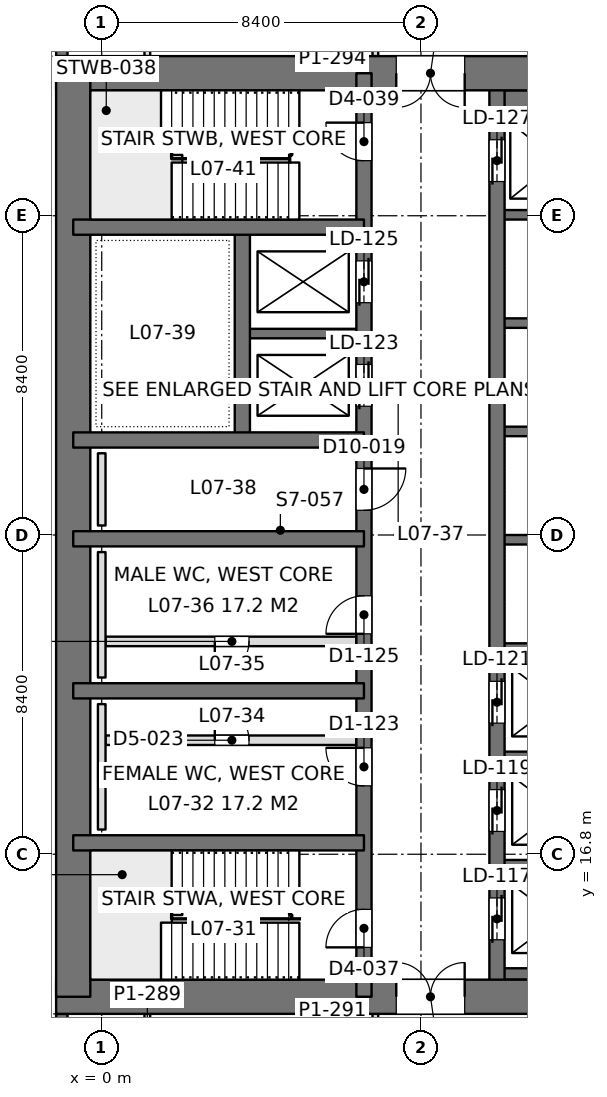
"""IFC4 building model, lengths in metres.
Left out: names, types, materials, properties, quantities, classifications, styles, units other than length and angle.
Written with IfcOpenShell. Run it as: python <this file> out.ifc"""

import sys

from ifc_helpers import new_model, si_unit, direction, frame, frame_2d, origin, place, context, subcontext, project, spatial, rectangle, extrude, element, fill, save


model = new_model("IFC4")
c1 = context("Model", 3, precision=1e-05, world=origin(), true_north=direction((0.0, 1.0)))
c2 = subcontext(c1, "Body", "Model", "MODEL_VIEW")
j1 = project(units=[si_unit("LENGTHUNIT", "METRE"), si_unit("PLANEANGLEUNIT", "RADIAN")], contexts=[c1])
p1 = place(None, origin())
s1 = spatial("IfcSite", under=j1, at=p1, CompositionType="ELEMENT")
p2 = place(p1, origin())
s2 = spatial("IfcBuilding", under=s1, at=p2, CompositionType="ELEMENT")
p3 = place(p2, frame((0.0, 0.0, 32.4)))
s3 = spatial("IfcBuildingStorey", under=s2, at=p3, CompositionType="ELEMENT", Elevation=32.4)
p4 = place(p3, frame((-1.2, 13.05, 0.0), z_axis=(0.0, 0.0, 1.0), x_axis=(1.0, 0.0, 0.0)))
e1 = element("IfcWall", 1, at=p4, inside=s3, PredefinedType="SHEAR", context=c2, shape_type="SweptSolid", body=[
    extrude(rectangle(XDim=18.0, YDim=0.9, at=frame_2d((9.0, 0.0))), origin(), (0.0, 0.0, 1.0), 4.5),
])
p5 = place(p4, frame((8.95, 0.0, 0.0)))
e2 = element("IfcOpeningElement", 2, at=p5, cuts=e1, PredefinedType="OPENING", context=c2, shape_type="SweptSolid", body=[
    extrude(rectangle(XDim=1.8, YDim=2.4, at=frame_2d((0.9, 1.2))), frame((0.0, 0.46, 0.0), z_axis=(0.0, -1.0, 0.0), x_axis=(1.0, 0.0, 0.0)), (0.0, 0.0, 1.0), 0.92),
])
p6 = place(p3, frame((-1.2, 37.35, 0.0), z_axis=(0.0, 0.0, 1.0), x_axis=(1.0, 0.0, 0.0)))
e3 = element("IfcWall", 3, at=p6, inside=s3, PredefinedType="SHEAR", context=c2, shape_type="SweptSolid", body=[
    extrude(rectangle(XDim=18.0, YDim=0.9, at=frame_2d((9.0, 0.0))), origin(), (0.0, 0.0, 1.0), 4.5),
])
p7 = place(p6, frame((8.95, 0.0, 0.0)))
e4 = element("IfcOpeningElement", 4, at=p7, cuts=e3, PredefinedType="OPENING", context=c2, shape_type="SweptSolid", body=[
    extrude(rectangle(XDim=1.8, YDim=2.4, at=frame_2d((0.9, 1.2))), frame((0.0, 0.46, 0.0), z_axis=(0.0, -1.0, 0.0), x_axis=(1.0, 0.0, 0.0)), (0.0, 0.0, 1.0), 0.92),
])
p8 = place(p3, frame((-0.75, 13.05, 0.0), z_axis=(0.0, 0.0, 1.0), x_axis=(0.0, 1.0, 0.0)))
e5 = element("IfcWall", 5, at=p8, inside=s3, PredefinedType="SHEAR", context=c2, shape_type="SweptSolid", body=[
    extrude(rectangle(XDim=24.3, YDim=0.9, at=frame_2d((12.15, 0.0))), origin(), (0.0, 0.0, 1.0), 4.5),
])
p9 = place(p3, frame((6.9, 13.05, 0.0), z_axis=(0.0, 0.0, 1.0), x_axis=(0.0, 1.0, 0.0)))
e6 = element("IfcWall", 6, at=p9, inside=s3, PredefinedType="SHEAR", context=c2, shape_type="SweptSolid", body=[
    extrude(rectangle(XDim=24.3, YDim=0.4, at=frame_2d((12.15, 0.0))), origin(), (0.0, 0.0, 1.0), 4.5),
])
p10 = place(p9, frame((1.3, 0.0, 0.0)))
e7 = element("IfcOpeningElement", 7, at=p10, cuts=e6, PredefinedType="OPENING", context=c2, shape_type="SweptSolid", body=[
    extrude(rectangle(XDim=1.0, YDim=2.2, at=frame_2d((0.5, 1.1))), frame((0.0, 0.21, 0.0), z_axis=(0.0, -1.0, 0.0), x_axis=(1.0, 0.0, 0.0)), (0.0, 0.0, 1.0), 0.42),
])
p11 = place(p9, frame((22.0, 0.0, 0.0)))
e8 = element("IfcOpeningElement", 8, at=p11, cuts=e6, PredefinedType="OPENING", context=c2, shape_type="SweptSolid", body=[
    extrude(rectangle(XDim=1.0, YDim=2.2, at=frame_2d((0.5, 1.1))), frame((0.0, 0.21, 0.0), z_axis=(0.0, -1.0, 0.0), x_axis=(1.0, 0.0, 0.0)), (0.0, 0.0, 1.0), 0.42),
])
p12 = place(p9, frame((5.55, 0.0, 0.0)))
e9 = element("IfcOpeningElement", 9, at=p12, cuts=e6, PredefinedType="OPENING", context=c2, shape_type="SweptSolid", body=[
    extrude(rectangle(XDim=1.0, YDim=2.2, at=frame_2d((0.5, 1.1))), frame((0.0, 0.21, 0.0), z_axis=(0.0, -1.0, 0.0), x_axis=(1.0, 0.0, 0.0)), (0.0, 0.0, 1.0), 0.42),
])
p13 = place(p9, frame((9.55, 0.0, 0.0)))
e10 = element("IfcOpeningElement", 10, at=p13, cuts=e6, PredefinedType="OPENING", context=c2, shape_type="SweptSolid", body=[
    extrude(rectangle(XDim=1.0, YDim=2.2, at=frame_2d((0.5, 1.1))), frame((0.0, 0.21, 0.0), z_axis=(0.0, -1.0, 0.0), x_axis=(1.0, 0.0, 0.0)), (0.0, 0.0, 1.0), 0.42),
])
p14 = place(p9, frame((12.8, 0.0, 0.0)))
e11 = element("IfcOpeningElement", 11, at=p14, cuts=e6, PredefinedType="OPENING", context=c2, shape_type="SweptSolid", body=[
    extrude(rectangle(XDim=1.1, YDim=2.2, at=frame_2d((0.55, 1.1))), frame((0.0, 0.21, 0.0), z_axis=(0.0, -1.0, 0.0), x_axis=(1.0, 0.0, 0.0)), (0.0, 0.0, 1.0), 0.42),
])
p15 = place(p9, frame((15.538, 0.0, 0.0)))
e12 = element("IfcOpeningElement", 12, at=p15, cuts=e6, PredefinedType="OPENING", context=c2, shape_type="SweptSolid", body=[
    extrude(rectangle(XDim=1.1, YDim=2.2, at=frame_2d((0.55, 1.1))), frame((0.0, 0.21, 0.0), z_axis=(0.0, -1.0, 0.0), x_axis=(1.0, 0.0, 0.0)), (0.0, 0.0, 1.0), 0.42),
])
p16 = place(p9, frame((18.262, 0.0, 0.0)))
e13 = element("IfcOpeningElement", 13, at=p16, cuts=e6, PredefinedType="OPENING", context=c2, shape_type="SweptSolid", body=[
    extrude(rectangle(XDim=1.1, YDim=2.2, at=frame_2d((0.55, 1.1))), frame((0.0, 0.21, 0.0), z_axis=(0.0, -1.0, 0.0), x_axis=(1.0, 0.0, 0.0)), (0.0, 0.0, 1.0), 0.42),
])
p17 = place(p3, frame((10.4, 13.05, 0.0), z_axis=(0.0, 0.0, 1.0), x_axis=(0.0, 1.0, 0.0)))
e14 = element("IfcWall", 14, at=p17, inside=s3, PredefinedType="SHEAR", context=c2, shape_type="SweptSolid", body=[
    extrude(rectangle(XDim=24.3, YDim=0.4, at=frame_2d((12.15, 0.0))), origin(), (0.0, 0.0, 1.0), 4.5),
])
p18 = place(p17, frame((1.5, 0.0, 0.0)))
e15 = element("IfcOpeningElement", 15, at=p18, cuts=e14, PredefinedType="OPENING", context=c2, shape_type="SweptSolid", body=[
    extrude(rectangle(XDim=1.1, YDim=2.2, at=frame_2d((0.55, 1.1))), frame((0.0, 0.21, 0.0), z_axis=(0.0, -1.0, 0.0), x_axis=(1.0, 0.0, 0.0)), (0.0, 0.0, 1.0), 0.42),
])
p19 = place(p17, frame((4.35, 0.0, 0.0)))
e16 = element("IfcOpeningElement", 16, at=p19, cuts=e14, PredefinedType="OPENING", context=c2, shape_type="SweptSolid", body=[
    extrude(rectangle(XDim=1.1, YDim=2.2, at=frame_2d((0.55, 1.1))), frame((0.0, 0.21, 0.0), z_axis=(0.0, -1.0, 0.0), x_axis=(1.0, 0.0, 0.0)), (0.0, 0.0, 1.0), 0.42),
])
p20 = place(p17, frame((7.2, 0.0, 0.0)))
e17 = element("IfcOpeningElement", 17, at=p20, cuts=e14, PredefinedType="OPENING", context=c2, shape_type="SweptSolid", body=[
    extrude(rectangle(XDim=1.1, YDim=2.2, at=frame_2d((0.55, 1.1))), frame((0.0, 0.21, 0.0), z_axis=(0.0, -1.0, 0.0), x_axis=(1.0, 0.0, 0.0)), (0.0, 0.0, 1.0), 0.42),
])
p21 = place(p17, frame((21.45, 0.0, 0.0)))
e18 = element("IfcOpeningElement", 18, at=p21, cuts=e14, PredefinedType="OPENING", context=c2, shape_type="SweptSolid", body=[
    extrude(rectangle(XDim=1.1, YDim=2.2, at=frame_2d((0.55, 1.1))), frame((0.0, 0.21, 0.0), z_axis=(0.0, -1.0, 0.0), x_axis=(1.0, 0.0, 0.0)), (0.0, 0.0, 1.0), 0.42),
])
for number, where, z_axis, x_axis in (
    (19, (-0.75, 17.1, 0.0), (0.0, 0.0, 1.0), (1.0, 0.0, 0.0)),
    (20, (-0.75, 21.1, 0.0), (0.0, 0.0, 1.0), (1.0, 0.0, 0.0)),
    (21, (-0.75, 25.1, 0.0), (0.0, 0.0, 1.0), (1.0, 0.0, 0.0)),
    (22, (-0.75, 27.7, 0.0), (0.0, 0.0, 1.0), (1.0, 0.0, 0.0)),
    (23, (-0.75, 33.3, 0.0), (0.0, 0.0, 1.0), (1.0, 0.0, 0.0)),
):
    element("IfcWall", number, at=place(p3, frame(where, z_axis=z_axis, x_axis=x_axis)), inside=s3, PredefinedType="SHEAR", context=c2, shape_type="SweptSolid", body=[
        extrude(rectangle(XDim=7.65, YDim=0.4, at=frame_2d((3.825, 0.0))), origin(), (0.0, 0.0, 1.0), 4.5),
    ])
p22 = place(p3, frame((3.7, 27.7, 0.0), z_axis=(0.0, 0.0, 1.0), x_axis=(0.0, 1.0, 0.0)))
e24 = element("IfcWall", 24, at=p22, inside=s3, PredefinedType="SHEAR", context=c2, shape_type="SweptSolid", body=[
    extrude(rectangle(XDim=5.6, YDim=0.4, at=frame_2d((2.8, 0.0))), origin(), (0.0, 0.0, 1.0), 4.5),
])
p23 = place(p3, frame((3.7, 30.5, 0.0), z_axis=(0.0, 0.0, 1.0), x_axis=(1.0, 0.0, 0.0)))
e25 = element("IfcWall", 25, at=p23, inside=s3, PredefinedType="SHEAR", context=c2, shape_type="SweptSolid", body=[
    extrude(rectangle(XDim=3.2, YDim=0.25, at=frame_2d((1.6, 0.0))), origin(), (0.0, 0.0, 1.0), 4.5),
])
p24 = place(p3, frame((10.4, 13.65, 0.0), z_axis=(0.0, 0.0, 1.0), x_axis=(1.0, 0.0, 0.0)))
e26 = element("IfcWall", 26, at=p24, inside=s3, PredefinedType="SHEAR", context=c2, shape_type="SweptSolid", body=[
    extrude(rectangle(XDim=3.2, YDim=0.3, at=frame_2d((1.6, 0.0))), origin(), (0.0, 0.0, 1.0), 4.5),
])
for number, where, z_axis, x_axis in (
    (27, (10.4, 16.525, 0.0), (0.0, 0.0, 1.0), (1.0, 0.0, 0.0)),
    (28, (10.4, 19.375, 0.0), (0.0, 0.0, 1.0), (1.0, 0.0, 0.0)),
    (29, (10.4, 22.225, 0.0), (0.0, 0.0, 1.0), (1.0, 0.0, 0.0)),
    (30, (10.4, 25.075, 0.0), (0.0, 0.0, 1.0), (1.0, 0.0, 0.0)),
    (31, (10.4, 27.925, 0.0), (0.0, 0.0, 1.0), (1.0, 0.0, 0.0)),
    (32, (10.4, 30.775, 0.0), (0.0, 0.0, 1.0), (1.0, 0.0, 0.0)),
    (33, (10.4, 33.625, 0.0), (0.0, 0.0, 1.0), (1.0, 0.0, 0.0)),
):
    element("IfcWall", number, at=place(p3, frame(where, z_axis=z_axis, x_axis=x_axis)), inside=s3, PredefinedType="SHEAR", context=c2, shape_type="SweptSolid", body=[
        extrude(rectangle(XDim=3.2, YDim=0.25, at=frame_2d((1.6, 0.0))), origin(), (0.0, 0.0, 1.0), 4.5),
    ])
p25 = place(p3, frame((10.4, 36.625, 0.0), z_axis=(0.0, 0.0, 1.0), x_axis=(1.0, 0.0, 0.0)))
e34 = element("IfcWall", 34, at=p25, inside=s3, PredefinedType="SHEAR", context=c2, shape_type="SweptSolid", body=[
    extrude(rectangle(XDim=3.2, YDim=0.55, at=frame_2d((1.6, 0.0))), origin(), (0.0, 0.0, 1.0), 4.5),
])
p26 = place(p3, frame((-1.05, 8.4, 0.0), z_axis=(0.0, 0.0, 1.0), x_axis=(0.0, 1.0, 0.0)))
e35 = element("IfcWall", 35, at=p26, inside=s3, PredefinedType="SOLIDWALL", context=c2, shape_type="SweptSolid", body=[
    extrude(rectangle(XDim=4.2, YDim=0.3, at=frame_2d((2.1, 0.0))), origin(), (0.0, 0.0, 1.0), 4.34),
])
p27 = place(p26, frame((0.9, 0.0, 0.9)))
e36 = element("IfcOpeningElement", 36, at=p27, cuts=e35, PredefinedType="OPENING", context=c2, shape_type="SweptSolid", body=[
    extrude(rectangle(XDim=2.4, YDim=1.9, at=frame_2d((1.2, 0.95))), frame((0.0, 0.16, 0.0), z_axis=(0.0, -1.0, 0.0), x_axis=(1.0, 0.0, 0.0)), (0.0, 0.0, 1.0), 0.32),
])
p28 = place(p3, frame((-1.05, 37.8, 0.0), z_axis=(0.0, 0.0, 1.0), x_axis=(0.0, 1.0, 0.0)))
e37 = element("IfcWall", 37, at=p28, inside=s3, PredefinedType="SOLIDWALL", context=c2, shape_type="SweptSolid", body=[
    extrude(rectangle(XDim=4.2, YDim=0.3, at=frame_2d((2.1, 0.0))), origin(), (0.0, 0.0, 1.0), 4.34),
])
p29 = place(p28, frame((0.9, 0.0, 0.9)))
e38 = element("IfcOpeningElement", 38, at=p29, cuts=e37, PredefinedType="OPENING", context=c2, shape_type="SweptSolid", body=[
    extrude(rectangle(XDim=2.4, YDim=1.9, at=frame_2d((1.2, 0.95))), frame((0.0, 0.16, 0.0), z_axis=(0.0, -1.0, 0.0), x_axis=(1.0, 0.0, 0.0)), (0.0, 0.0, 1.0), 0.32),
])
p30 = place(p3, frame((7.2, 10.474, 0.0), z_axis=(0.0, 0.0, 1.0), x_axis=(0.0, 1.0, 0.0)))
e39 = element("IfcWall", 39, at=p30, inside=s3, PredefinedType="PARTITIONING", context=c2, shape_type="SweptSolid", body=[
    extrude(rectangle(XDim=2.128, YDim=0.15, at=frame_2d((1.064, 0.0))), origin(), (0.0, 0.0, 1.0), 4.34),
])
p31 = place(p30, frame((0.526, 0.0, 0.0)))
e40 = element("IfcOpeningElement", 40, at=p31, cuts=e39, PredefinedType="OPENING", context=c2, shape_type="SweptSolid", body=[
    extrude(rectangle(XDim=1.0, YDim=2.2, at=frame_2d((0.5, 1.1))), frame((0.0, 0.085, 0.0), z_axis=(0.0, -1.0, 0.0), x_axis=(1.0, 0.0, 0.0)), (0.0, 0.0, 1.0), 0.17),
])
p32 = place(p3, frame((1.2, 10.4, 0.0), z_axis=(0.0, 0.0, 1.0), x_axis=(0.0, 1.0, 0.0)))
e41 = element("IfcWall", 41, at=p32, inside=s3, PredefinedType="PARTITIONING", context=c2, shape_type="SweptSolid", body=[
    extrude(rectangle(XDim=2.202, YDim=0.15, at=frame_2d((1.101, 0.0))), origin(), (0.0, 0.0, 1.0), 4.34),
])
p33 = place(p3, frame((7.2, 37.8, 0.0), z_axis=(0.0, 0.0, 1.0), x_axis=(0.0, 1.0, 0.0)))
e42 = element("IfcWall", 42, at=p33, inside=s3, PredefinedType="PARTITIONING", context=c2, shape_type="SweptSolid", body=[
    extrude(rectangle(XDim=2.126, YDim=0.15, at=frame_2d((1.063, 0.0))), origin(), (0.0, 0.0, 1.0), 4.34),
])
p34 = place(p33, frame((0.6, 0.0, 0.0)))
e43 = element("IfcOpeningElement", 43, at=p34, cuts=e42, PredefinedType="OPENING", context=c2, shape_type="SweptSolid", body=[
    extrude(rectangle(XDim=1.0, YDim=2.2, at=frame_2d((0.5, 1.1))), frame((0.0, 0.085, 0.0), z_axis=(0.0, -1.0, 0.0), x_axis=(1.0, 0.0, 0.0)), (0.0, 0.0, 1.0), 0.17),
])
p35 = place(p3, frame((1.2, 37.8, 0.0), z_axis=(0.0, 0.0, 1.0), x_axis=(0.0, 1.0, 0.0)))
e44 = element("IfcWall", 44, at=p35, inside=s3, PredefinedType="PARTITIONING", context=c2, shape_type="SweptSolid", body=[
    extrude(rectangle(XDim=2.2, YDim=0.15, at=frame_2d((1.1, 0.0))), origin(), (0.0, 0.0, 1.0), 4.34),
])
p36 = place(p3, frame((0.1, 22.4, 0.0), z_axis=(0.0, 0.0, 1.0), x_axis=(1.0, 0.0, 0.0)))
e45 = element("IfcWall", 45, at=p36, inside=s3, PredefinedType="PARTITIONING", context=c2, shape_type="SweptSolid", body=[
    extrude(rectangle(XDim=6.6, YDim=0.25, at=frame_2d((3.3, 0.0))), origin(), (0.0, 0.0, 1.0), 4.3),
])
p37 = place(p36, frame((2.875, 0.0, 0.0)))
e46 = element("IfcOpeningElement", 46, at=p37, cuts=e45, PredefinedType="OPENING", context=c2, shape_type="SweptSolid", body=[
    extrude(rectangle(XDim=0.9, YDim=2.2, at=frame_2d((0.45, 1.1))), frame((0.0, 0.135, 0.0), z_axis=(0.0, -1.0, 0.0), x_axis=(1.0, 0.0, 0.0)), (0.0, 0.0, 1.0), 0.27),
])
p38 = place(p3, frame((0.1, 19.8, 0.0), z_axis=(0.0, 0.0, 1.0), x_axis=(1.0, 0.0, 0.0)))
e47 = element("IfcWall", 47, at=p38, inside=s3, PredefinedType="PARTITIONING", context=c2, shape_type="SweptSolid", body=[
    extrude(rectangle(XDim=6.6, YDim=0.25, at=frame_2d((3.3, 0.0))), origin(), (0.0, 0.0, 1.0), 4.3),
])
p39 = place(p38, frame((2.875, 0.0, 0.0)))
e48 = element("IfcOpeningElement", 48, at=p39, cuts=e47, PredefinedType="OPENING", context=c2, shape_type="SweptSolid", body=[
    extrude(rectangle(XDim=0.9, YDim=2.2, at=frame_2d((0.45, 1.1))), frame((0.0, 0.135, 0.0), z_axis=(0.0, -1.0, 0.0), x_axis=(1.0, 0.0, 0.0)), (0.0, 0.0, 1.0), 0.27),
])
for number, where, z_axis, x_axis in (
    (49, (0.0, 17.45, 0.0), (0.0, 0.0, 1.0), (0.0, 1.0, 0.0)),
    (50, (0.0, 21.45, 0.0), (0.0, 0.0, 1.0), (0.0, 1.0, 0.0)),
):
    element("IfcWall", number, at=place(p3, frame(where, z_axis=z_axis, x_axis=x_axis)), inside=s3, PredefinedType="PLUMBINGWALL", context=c2, shape_type="SweptSolid", body=[
        extrude(rectangle(XDim=3.3, YDim=0.2, at=frame_2d((1.65, 0.0))), origin(), (0.0, 0.0, 1.0), 1.2),
    ])
p40 = place(p3, frame((0.0, 25.45, 0.0), z_axis=(0.0, 0.0, 1.0), x_axis=(0.0, 1.0, 0.0)))
e51 = element("IfcWall", 51, at=p40, inside=s3, PredefinedType="PLUMBINGWALL", context=c2, shape_type="SweptSolid", body=[
    extrude(rectangle(XDim=1.9, YDim=0.2, at=frame_2d((0.95, 0.0))), origin(), (0.0, 0.0, 1.0), 1.2),
])
p41 = place(p5, origin())
e52 = element("IfcDoor", 52, at=p41, inside=s3, OperationType="DOUBLE_DOOR_SINGLE_SWING", PredefinedType="DOOR", context=c2, shape_type="SweptSolid", body=[
    extrude(rectangle(XDim=1.8, YDim=2.4, at=frame_2d((0.9, 1.2))), frame((0.0, 0.025, 0.0), z_axis=(0.0, -1.0, 0.0), x_axis=(1.0, 0.0, 0.0)), (0.0, 0.0, 1.0), 0.05),
])
fill(e2, e52)
p42 = place(p7, frame((1.8, 0.0, 0.0), z_axis=(0.0, 0.0, 1.0), x_axis=(-1.0, 0.0, 0.0)))
e53 = element("IfcDoor", 53, at=p42, inside=s3, OperationType="DOUBLE_DOOR_SINGLE_SWING", PredefinedType="DOOR", context=c2, shape_type="SweptSolid", body=[
    extrude(rectangle(XDim=1.8, YDim=2.4, at=frame_2d((0.9, 1.2))), frame((0.0, 0.025, 0.0), z_axis=(0.0, -1.0, 0.0), x_axis=(1.0, 0.0, 0.0)), (0.0, 0.0, 1.0), 0.05),
])
fill(e4, e53)
p43 = place(p10, origin())
e54 = element("IfcDoor", 54, at=p43, inside=s3, OperationType="SINGLE_SWING_LEFT", PredefinedType="DOOR", context=c2, shape_type="SweptSolid", body=[
    extrude(rectangle(XDim=1.0, YDim=2.2, at=frame_2d((0.5, 1.1))), frame((0.0, 0.025, 0.0), z_axis=(0.0, -1.0, 0.0), x_axis=(1.0, 0.0, 0.0)), (0.0, 0.0, 1.0), 0.05),
])
fill(e7, e54)
p44 = place(p11, origin())
e55 = element("IfcDoor", 55, at=p44, inside=s3, OperationType="SINGLE_SWING_RIGHT", PredefinedType="DOOR", context=c2, shape_type="SweptSolid", body=[
    extrude(rectangle(XDim=1.0, YDim=2.2, at=frame_2d((0.5, 1.1))), frame((0.0, 0.025, 0.0), z_axis=(0.0, -1.0, 0.0), x_axis=(1.0, 0.0, 0.0)), (0.0, 0.0, 1.0), 0.05),
])
fill(e8, e55)
p45 = place(p12, origin())
e56 = element("IfcDoor", 56, at=p45, inside=s3, OperationType="SINGLE_SWING_RIGHT", PredefinedType="DOOR", context=c2, shape_type="SweptSolid", body=[
    extrude(rectangle(XDim=1.0, YDim=2.2, at=frame_2d((0.5, 1.1))), frame((0.0, 0.025, 0.0), z_axis=(0.0, -1.0, 0.0), x_axis=(1.0, 0.0, 0.0)), (0.0, 0.0, 1.0), 0.05),
])
fill(e9, e56)
p46 = place(p13, origin())
e57 = element("IfcDoor", 57, at=p46, inside=s3, OperationType="SINGLE_SWING_LEFT", PredefinedType="DOOR", context=c2, shape_type="SweptSolid", body=[
    extrude(rectangle(XDim=1.0, YDim=2.2, at=frame_2d((0.5, 1.1))), frame((0.0, 0.025, 0.0), z_axis=(0.0, -1.0, 0.0), x_axis=(1.0, 0.0, 0.0)), (0.0, 0.0, 1.0), 0.05),
])
fill(e10, e57)
p47 = place(p14, frame((1.1, 0.0, 0.0), z_axis=(0.0, 0.0, 1.0), x_axis=(-1.0, 0.0, 0.0)))
e58 = element("IfcDoor", 58, at=p47, inside=s3, OperationType="SINGLE_SWING_LEFT", PredefinedType="DOOR", context=c2, shape_type="SweptSolid", body=[
    extrude(rectangle(XDim=1.1, YDim=2.2, at=frame_2d((0.55, 1.1))), frame((0.0, 0.025, 0.0), z_axis=(0.0, -1.0, 0.0), x_axis=(1.0, 0.0, 0.0)), (0.0, 0.0, 1.0), 0.05),
])
fill(e11, e58)
p48 = place(p18, origin())
e59 = element("IfcDoor", 59, at=p48, inside=s3, OperationType="DOUBLE_DOOR_SLIDING", PredefinedType="DOOR", context=c2, shape_type="SweptSolid", body=[
    extrude(rectangle(XDim=1.1, YDim=2.2, at=frame_2d((0.55, 1.1))), frame((0.0, 0.025, 0.0), z_axis=(0.0, -1.0, 0.0), x_axis=(1.0, 0.0, 0.0)), (0.0, 0.0, 1.0), 0.05),
])
fill(e15, e59)
p49 = place(p19, origin())
e60 = element("IfcDoor", 60, at=p49, inside=s3, OperationType="DOUBLE_DOOR_SLIDING", PredefinedType="DOOR", context=c2, shape_type="SweptSolid", body=[
    extrude(rectangle(XDim=1.1, YDim=2.2, at=frame_2d((0.55, 1.1))), frame((0.0, 0.025, 0.0), z_axis=(0.0, -1.0, 0.0), x_axis=(1.0, 0.0, 0.0)), (0.0, 0.0, 1.0), 0.05),
])
fill(e16, e60)
p50 = place(p20, origin())
e61 = element("IfcDoor", 61, at=p50, inside=s3, OperationType="DOUBLE_DOOR_SLIDING", PredefinedType="DOOR", context=c2, shape_type="SweptSolid", body=[
    extrude(rectangle(XDim=1.1, YDim=2.2, at=frame_2d((0.55, 1.1))), frame((0.0, 0.025, 0.0), z_axis=(0.0, -1.0, 0.0), x_axis=(1.0, 0.0, 0.0)), (0.0, 0.0, 1.0), 0.05),
])
fill(e17, e61)
p51 = place(p21, origin())
e62 = element("IfcDoor", 62, at=p51, inside=s3, OperationType="DOUBLE_DOOR_SLIDING", PredefinedType="DOOR", context=c2, shape_type="SweptSolid", body=[
    extrude(rectangle(XDim=1.1, YDim=2.2, at=frame_2d((0.55, 1.1))), frame((0.0, 0.025, 0.0), z_axis=(0.0, -1.0, 0.0), x_axis=(1.0, 0.0, 0.0)), (0.0, 0.0, 1.0), 0.05),
])
fill(e18, e62)
p52 = place(p15, origin())
e63 = element("IfcDoor", 63, at=p52, inside=s3, OperationType="DOUBLE_DOOR_SLIDING", PredefinedType="DOOR", context=c2, shape_type="SweptSolid", body=[
    extrude(rectangle(XDim=1.1, YDim=2.2, at=frame_2d((0.55, 1.1))), frame((0.0, 0.025, 0.0), z_axis=(0.0, -1.0, 0.0), x_axis=(1.0, 0.0, 0.0)), (0.0, 0.0, 1.0), 0.05),
])
fill(e12, e63)
p53 = place(p16, origin())
e64 = element("IfcDoor", 64, at=p53, inside=s3, OperationType="DOUBLE_DOOR_SLIDING", PredefinedType="DOOR", context=c2, shape_type="SweptSolid", body=[
    extrude(rectangle(XDim=1.1, YDim=2.2, at=frame_2d((0.55, 1.1))), frame((0.0, 0.025, 0.0), z_axis=(0.0, -1.0, 0.0), x_axis=(1.0, 0.0, 0.0)), (0.0, 0.0, 1.0), 0.05),
])
fill(e13, e64)
p54 = place(p37, frame((0.9, 0.0, 0.0), z_axis=(0.0, 0.0, 1.0), x_axis=(-1.0, 0.0, 0.0)))
e65 = element("IfcDoor", 65, at=p54, inside=s3, OperationType="SINGLE_SWING_RIGHT", PredefinedType="DOOR", context=c2, shape_type="SweptSolid", body=[
    extrude(rectangle(XDim=0.9, YDim=2.2, at=frame_2d((0.45, 1.1))), frame((0.0, 0.025, 0.0), z_axis=(0.0, -1.0, 0.0), x_axis=(1.0, 0.0, 0.0)), (0.0, 0.0, 1.0), 0.05),
])
fill(e46, e65)
p55 = place(p39, origin())
e66 = element("IfcDoor", 66, at=p55, inside=s3, OperationType="SINGLE_SWING_LEFT", PredefinedType="DOOR", context=c2, shape_type="SweptSolid", body=[
    extrude(rectangle(XDim=0.9, YDim=2.2, at=frame_2d((0.45, 1.1))), frame((0.0, 0.025, 0.0), z_axis=(0.0, -1.0, 0.0), x_axis=(1.0, 0.0, 0.0)), (0.0, 0.0, 1.0), 0.05),
])
fill(e48, e66)
save(model, sys.argv[1])
